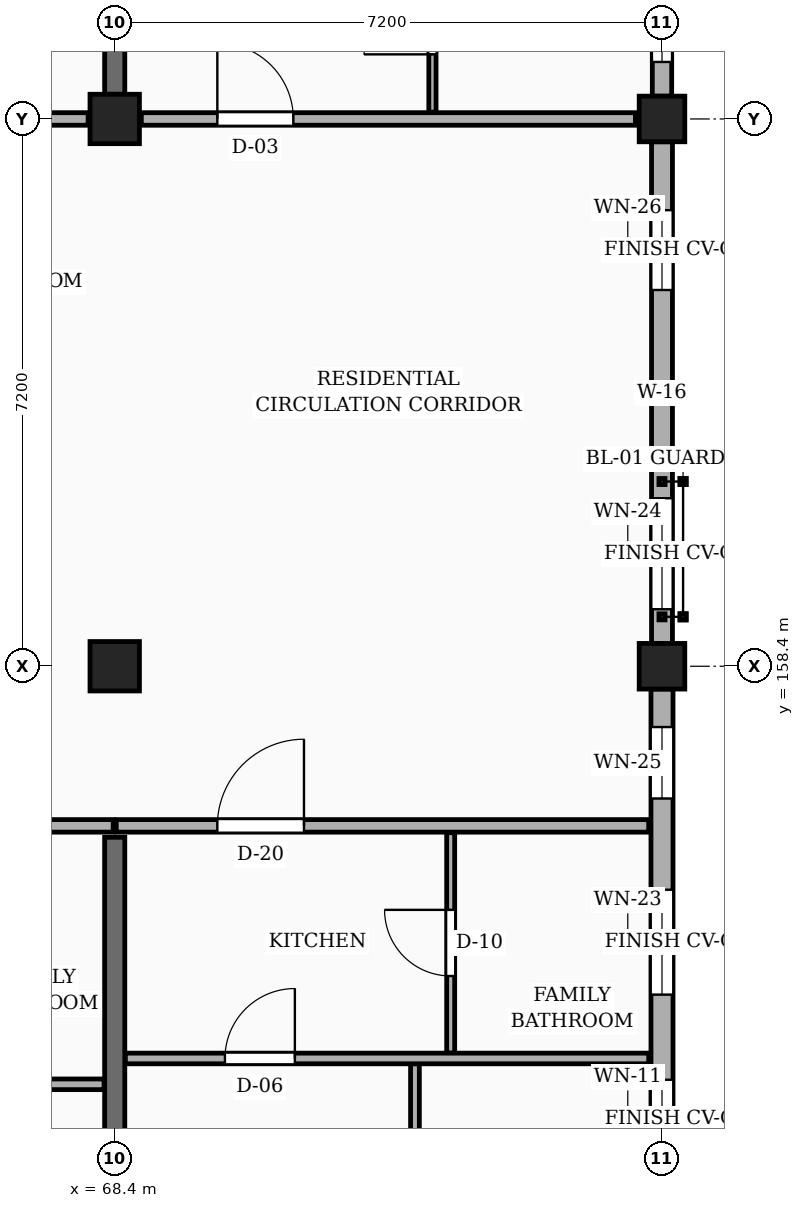
"""IFC4 building model, lengths in metres.
Left out: names, types, materials, properties, quantities, classifications, styles, units other than length and angle.
Written with IfcOpenShell. Run it as: python <this file> out.ifc"""

import sys

from ifc_helpers import new_model, si_unit, direction, frame, frame_2d, origin, origin_2d, place, context, subcontext, project, spatial, rectangle, extrude, element, fill, save


model = new_model("IFC4")
c1 = context("Model", 3, precision=1e-05, world=origin(), true_north=direction((0.0, 1.0)))
c2 = subcontext(c1, "Body", "Model", "MODEL_VIEW")
j1 = project(units=[si_unit("LENGTHUNIT", "METRE"), si_unit("PLANEANGLEUNIT", "RADIAN")], contexts=[c1])
p1 = place(None, origin())
s1 = spatial("IfcSite", under=j1, at=p1, CompositionType="ELEMENT")
p2 = place(p1, origin())
s2 = spatial("IfcBuilding", under=s1, at=p2, CompositionType="ELEMENT")
p3 = place(p2, frame((0.0, 0.0, 7.65)))
s3 = spatial("IfcBuildingStorey", under=s2, at=p3, CompositionType="ELEMENT", Elevation=7.65)
for number, where, z_axis, x_axis in (
    (1, (68.4, 158.4, 0.0), (0.0, 0.0, 1.0), (1.0, 0.0, 0.0)),
    (2, (68.4, 165.6, 0.0), (0.0, 0.0, 1.0), (1.0, 0.0, 0.0)),
):
    element("IfcColumn", number, at=place(p3, frame(where, z_axis=z_axis, x_axis=x_axis)), inside=s3, PredefinedType="COLUMN", context=c2, shape_type="SweptSolid", body=[
        extrude(rectangle(XDim=0.65, YDim=0.65, at=origin_2d()), origin(), (0.0, 0.0, 1.0), 3.15),
    ])
for number, where, z_axis, x_axis in (
    (3, (75.6, 158.4, 0.0), (0.0, 0.0, 1.0), (1.0, 0.0, 0.0)),
    (4, (75.6, 165.6, 0.0), (0.0, 0.0, 1.0), (1.0, 0.0, 0.0)),
):
    element("IfcColumn", number, at=place(p3, frame(where, z_axis=z_axis, x_axis=x_axis)), inside=s3, PredefinedType="COLUMN", context=c2, shape_type="SweptSolid", body=[
        extrude(rectangle(XDim=0.6, YDim=0.6, at=origin_2d()), origin(), (0.0, 0.0, 1.0), 3.15),
    ])
p4 = place(p3, frame((68.4, 144.3, 0.0), z_axis=(0.0, 0.0, 1.0), x_axis=(0.0, 1.0, 0.0)))
e5 = element("IfcWall", 5, at=p4, inside=s3, PredefinedType="SOLIDWALL", context=c2, shape_type="SweptSolid", body=[
    extrude(rectangle(XDim=11.85, YDim=0.265, at=frame_2d((5.925, 0.0))), origin(), (0.0, 0.0, 1.0), 2.185),
])
p5 = place(p3, frame((68.4, 165.925, 0.0), z_axis=(0.0, 0.0, 1.0), x_axis=(0.0, 1.0, 0.0)))
e6 = element("IfcWall", 6, at=p5, inside=s3, PredefinedType="SOLIDWALL", context=c2, shape_type="SweptSolid", body=[
    extrude(rectangle(XDim=6.575, YDim=0.265, at=frame_2d((3.288, 0.0))), origin(), (0.0, 0.0, 1.0), 2.185),
])
p6 = place(p3, frame((75.6, 151.5, 0.0), z_axis=(0.0, 0.0, 1.0), x_axis=(0.0, 1.0, 0.0)))
e7 = element("IfcWall", 7, at=p6, inside=s3, PredefinedType="SOLIDWALL", context=c2, shape_type="SweptSolid", body=[
    extrude(rectangle(XDim=6.6, YDim=0.29, at=frame_2d((3.3, 0.0))), origin(), (0.0, 0.0, 1.0), 2.455),
])
p7 = place(p6, frame((0.42, 0.0, 0.78)))
e8 = element("IfcOpeningElement", 8, at=p7, cuts=e7, PredefinedType="OPENING", context=c2, shape_type="SweptSolid", body=[
    extrude(rectangle(XDim=1.04, YDim=1.26, at=frame_2d((0.52, 0.63))), frame((0.0, 0.155, 0.0), z_axis=(0.0, -1.0, 0.0), x_axis=(1.0, 0.0, 0.0)), (0.0, 0.0, 1.0), 0.31),
])
p8 = place(p6, frame((2.58, 0.0, 0.78)))
e9 = element("IfcOpeningElement", 9, at=p8, cuts=e7, PredefinedType="OPENING", context=c2, shape_type="SweptSolid", body=[
    extrude(rectangle(XDim=1.38, YDim=1.36, at=frame_2d((0.69, 0.68))), frame((0.0, 0.155, 0.0), z_axis=(0.0, -1.0, 0.0), x_axis=(1.0, 0.0, 0.0)), (0.0, 0.0, 1.0), 0.31),
])
p9 = place(p6, frame((5.16, 0.0, 0.78)))
e10 = element("IfcOpeningElement", 10, at=p9, cuts=e7, PredefinedType="OPENING", context=c2, shape_type="SweptSolid", body=[
    extrude(rectangle(XDim=0.94, YDim=1.44, at=frame_2d((0.47, 0.72))), frame((0.0, 0.155, 0.0), z_axis=(0.0, -1.0, 0.0), x_axis=(1.0, 0.0, 0.0)), (0.0, 0.0, 1.0), 0.31),
])
p10 = place(p3, frame((75.6, 158.7, 0.0), z_axis=(0.0, 0.0, 1.0), x_axis=(0.0, 1.0, 0.0)))
e11 = element("IfcWall", 11, at=p10, inside=s3, PredefinedType="SOLIDWALL", context=c2, shape_type="SweptSolid", body=[
    extrude(rectangle(XDim=6.6, YDim=0.275, at=frame_2d((3.3, 0.0))), origin(), (0.0, 0.0, 1.0), 2.455),
])
p11 = place(p10, frame((0.45, 0.0, 0.78)))
e12 = element("IfcOpeningElement", 12, at=p11, cuts=e11, PredefinedType="OPENING", context=c2, shape_type="SweptSolid", body=[
    extrude(rectangle(XDim=1.46, YDim=1.36, at=frame_2d((0.73, 0.68))), frame((0.0, 0.147, 0.0), z_axis=(0.0, -1.0, 0.0), x_axis=(1.0, 0.0, 0.0)), (0.0, 0.0, 1.0), 0.295),
])
p12 = place(p10, frame((4.65, 0.0, 0.78)))
e13 = element("IfcOpeningElement", 13, at=p12, cuts=e11, PredefinedType="OPENING", context=c2, shape_type="SweptSolid", body=[
    extrude(rectangle(XDim=1.05, YDim=1.44, at=frame_2d((0.525, 0.72))), frame((0.0, 0.147, 0.0), z_axis=(0.0, -1.0, 0.0), x_axis=(1.0, 0.0, 0.0)), (0.0, 0.0, 1.0), 0.295),
])
p13 = place(p3, frame((75.6, 165.9, 0.0), z_axis=(0.0, 0.0, 1.0), x_axis=(0.0, 1.0, 0.0)))
e14 = element("IfcWall", 14, at=p13, inside=s3, PredefinedType="SOLIDWALL", context=c2, shape_type="SweptSolid", body=[
    extrude(rectangle(XDim=6.6, YDim=0.255, at=frame_2d((3.3, 0.0))), origin(), (0.0, 0.0, 1.0), 2.455),
])
p14 = place(p13, frame((0.45, 0.0, 0.78)))
e15 = element("IfcOpeningElement", 15, at=p14, cuts=e14, PredefinedType="OPENING", context=c2, shape_type="SweptSolid", body=[
    extrude(rectangle(XDim=1.05, YDim=1.44, at=frame_2d((0.525, 0.72))), frame((0.0, 0.137, 0.0), z_axis=(0.0, -1.0, 0.0), x_axis=(1.0, 0.0, 0.0)), (0.0, 0.0, 1.0), 0.275),
])
p15 = place(p13, frame((4.65, 0.0, 0.78)))
e16 = element("IfcOpeningElement", 16, at=p15, cuts=e14, PredefinedType="OPENING", context=c2, shape_type="SweptSolid", body=[
    extrude(rectangle(XDim=1.25, YDim=1.44, at=frame_2d((0.625, 0.72))), frame((0.0, 0.137, 0.0), z_axis=(0.0, -1.0, 0.0), x_axis=(1.0, 0.0, 0.0)), (0.0, 0.0, 1.0), 0.275),
])
p16 = place(p3, frame((61.22, 156.3, 0.0), z_axis=(0.0, 0.0, 1.0), x_axis=(1.0, 0.0, 0.0)))
e17 = element("IfcWall", 17, at=p16, inside=s3, PredefinedType="PARTITIONING", context=c2, shape_type="SweptSolid", body=[
    extrude(rectangle(XDim=7.16, YDim=0.165, at=frame_2d((3.58, 0.0))), origin(), (0.0, 0.0, 1.0), 2.32),
])
p17 = place(p16, frame((1.33, 0.0, 0.0)))
e18 = element("IfcOpeningElement", 18, at=p17, cuts=e17, PredefinedType="OPENING", context=c2, shape_type="SweptSolid", body=[
    extrude(rectangle(XDim=0.94, YDim=2.12, at=frame_2d((0.47, 1.06))), frame((0.0, 0.093, 0.0), z_axis=(0.0, -1.0, 0.0), x_axis=(1.0, 0.0, 0.0)), (0.0, 0.0, 1.0), 0.185),
])
p18 = place(p3, frame((68.42, 156.3, 0.0), z_axis=(0.0, 0.0, 1.0), x_axis=(1.0, 0.0, 0.0)))
e19 = element("IfcWall", 19, at=p18, inside=s3, PredefinedType="PARTITIONING", context=c2, shape_type="SweptSolid", body=[
    extrude(rectangle(XDim=7.005, YDim=0.165, at=frame_2d((3.502, 0.0))), origin(), (0.0, 0.0, 1.0), 2.32),
])
p19 = place(p18, frame((1.33, 0.0, 0.0)))
e20 = element("IfcOpeningElement", 20, at=p19, cuts=e19, PredefinedType="OPENING", context=c2, shape_type="SweptSolid", body=[
    extrude(rectangle(XDim=1.14, YDim=2.18, at=frame_2d((0.57, 1.09))), frame((0.0, 0.093, 0.0), z_axis=(0.0, -1.0, 0.0), x_axis=(1.0, 0.0, 0.0)), (0.0, 0.0, 1.0), 0.185),
])
p20 = place(p3, frame((61.55, 165.6, 0.0), z_axis=(0.0, 0.0, 1.0), x_axis=(1.0, 0.0, 0.0)))
e21 = element("IfcWall", 21, at=p20, inside=s3, PredefinedType="PARTITIONING", context=c2, shape_type="SweptSolid", body=[
    extrude(rectangle(XDim=6.5, YDim=0.165, at=frame_2d((3.25, 0.0))), origin(), (0.0, 0.0, 1.0), 2.185),
])
p21 = place(p20, frame((1.0, 0.0, 0.0)))
e22 = element("IfcOpeningElement", 22, at=p21, cuts=e21, PredefinedType="OPENING", context=c2, shape_type="SweptSolid", body=[
    extrude(rectangle(XDim=1.14, YDim=2.18, at=frame_2d((0.57, 1.09))), frame((0.0, 0.093, 0.0), z_axis=(0.0, -1.0, 0.0), x_axis=(1.0, 0.0, 0.0)), (0.0, 0.0, 1.0), 0.185),
])
p22 = place(p3, frame((68.75, 165.6, 0.0), z_axis=(0.0, 0.0, 1.0), x_axis=(1.0, 0.0, 0.0)))
e23 = element("IfcWall", 23, at=p22, inside=s3, PredefinedType="PARTITIONING", context=c2, shape_type="SweptSolid", body=[
    extrude(rectangle(XDim=6.5, YDim=0.165, at=frame_2d((3.25, 0.0))), origin(), (0.0, 0.0, 1.0), 2.185),
])
p23 = place(p22, frame((1.0, 0.0, 0.0)))
e24 = element("IfcOpeningElement", 24, at=p23, cuts=e23, PredefinedType="OPENING", context=c2, shape_type="SweptSolid", body=[
    extrude(rectangle(XDim=1.0, YDim=2.15, at=frame_2d((0.5, 1.075))), frame((0.0, 0.093, 0.0), z_axis=(0.0, -1.0, 0.0), x_axis=(1.0, 0.0, 0.0)), (0.0, 0.0, 1.0), 0.185),
])
p24 = place(p3, frame((61.34, 152.9, 0.0), z_axis=(0.0, 0.0, 1.0), x_axis=(1.0, 0.0, 0.0)))
e25 = element("IfcWall", 25, at=p24, inside=s3, PredefinedType="PARTITIONING", context=c2, shape_type="SweptSolid", body=[
    extrude(rectangle(XDim=6.92, YDim=0.14, at=frame_2d((3.46, 0.0))), origin(), (0.0, 0.0, 1.0), 2.32),
])
p25 = place(p24, frame((1.31, 0.0, 0.0)))
e26 = element("IfcOpeningElement", 26, at=p25, cuts=e25, PredefinedType="OPENING", context=c2, shape_type="SweptSolid", body=[
    extrude(rectangle(XDim=0.95, YDim=2.1, at=frame_2d((0.475, 1.05))), frame((0.0, 0.08, 0.0), z_axis=(0.0, -1.0, 0.0), x_axis=(1.0, 0.0, 0.0)), (0.0, 0.0, 1.0), 0.16),
])
p26 = place(p3, frame((72.35, 144.175, 0.0), z_axis=(0.0, 0.0, 1.0), x_axis=(0.0, 1.0, 0.0)))
e27 = element("IfcWall", 27, at=p26, inside=s3, PredefinedType="PARTITIONING", context=c2, shape_type="SweptSolid", body=[
    extrude(rectangle(XDim=8.995, YDim=0.115, at=frame_2d((4.498, 0.0))), origin(), (0.0, 0.0, 1.0), 2.32),
])
p27 = place(p26, frame((4.058, 0.0, 0.0)))
e28 = element("IfcOpeningElement", 28, at=p27, cuts=e27, PredefinedType="OPENING", context=c2, shape_type="SweptSolid", body=[
    extrude(rectangle(XDim=0.88, YDim=2.08, at=frame_2d((0.44, 1.04))), frame((0.0, 0.067, 0.0), z_axis=(0.0, -1.0, 0.0), x_axis=(1.0, 0.0, 0.0)), (0.0, 0.0, 1.0), 0.135),
])
p28 = place(p3, frame((72.82, 153.31, 0.0), z_axis=(0.0, 0.0, 1.0), x_axis=(0.0, 1.0, 0.0)))
e29 = element("IfcWall", 29, at=p28, inside=s3, PredefinedType="PARTITIONING", context=c2, shape_type="SweptSolid", body=[
    extrude(rectangle(XDim=2.9, YDim=0.105, at=frame_2d((1.45, 0.0))), origin(), (0.0, 0.0, 1.0), 2.32),
])
p29 = place(p28, frame((1.015, 0.0, 0.0)))
e30 = element("IfcOpeningElement", 30, at=p29, cuts=e29, PredefinedType="OPENING", context=c2, shape_type="SweptSolid", body=[
    extrude(rectangle(XDim=0.87, YDim=2.05, at=frame_2d((0.435, 1.025))), frame((0.0, 0.062, 0.0), z_axis=(0.0, -1.0, 0.0), x_axis=(1.0, 0.0, 0.0)), (0.0, 0.0, 1.0), 0.125),
])
p30 = place(p3, frame((68.54, 153.24, 0.0), z_axis=(0.0, 0.0, 1.0), x_axis=(1.0, 0.0, 0.0)))
e31 = element("IfcWall", 31, at=p30, inside=s3, PredefinedType="PARTITIONING", context=c2, shape_type="SweptSolid", body=[
    extrude(rectangle(XDim=6.885, YDim=0.14, at=frame_2d((3.442, 0.0))), origin(), (0.0, 0.0, 1.0), 2.32),
])
p31 = place(p30, frame((1.31, 0.0, 0.0)))
e32 = element("IfcOpeningElement", 32, at=p31, cuts=e31, PredefinedType="OPENING", context=c2, shape_type="SweptSolid", body=[
    extrude(rectangle(XDim=0.92, YDim=2.1, at=frame_2d((0.46, 1.05))), frame((0.0, 0.08, 0.0), z_axis=(0.0, -1.0, 0.0), x_axis=(1.0, 0.0, 0.0)), (0.0, 0.0, 1.0), 0.16),
])
p32 = place(p3, frame((72.58, 165.69, 0.0), z_axis=(0.0, 0.0, 1.0), x_axis=(0.0, 1.0, 0.0)))
e33 = element("IfcWall", 33, at=p32, inside=s3, PredefinedType="PARTITIONING", context=c2, shape_type="SweptSolid", body=[
    extrude(rectangle(XDim=2.42, YDim=0.095, at=frame_2d((1.21, 0.0))), origin(), (0.0, 0.0, 1.0), 2.32),
])
p33 = place(p32, frame((0.76, 0.0, 0.0)))
e34 = element("IfcOpeningElement", 34, at=p33, cuts=e33, PredefinedType="OPENING", context=c2, shape_type="SweptSolid", body=[
    extrude(rectangle(XDim=0.9, YDim=2.05, at=frame_2d((0.45, 1.025))), frame((0.0, 0.058, 0.0), z_axis=(0.0, -1.0, 0.0), x_axis=(1.0, 0.0, 0.0)), (0.0, 0.0, 1.0), 0.115),
])
p34 = place(p7, origin())
e35 = element("IfcWindow", 35, at=p34, inside=s3, PartitioningType="SINGLE_PANEL", PredefinedType="WINDOW", context=c2, shape_type="SweptSolid", body=[
    extrude(rectangle(XDim=1.04, YDim=1.26, at=frame_2d((0.52, 0.63))), frame((0.0, 0.03, 0.0), z_axis=(0.0, -1.0, 0.0), x_axis=(1.0, 0.0, 0.0)), (0.0, 0.0, 1.0), 0.06),
])
fill(e8, e35)
p35 = place(p8, origin())
e36 = element("IfcWindow", 36, at=p35, inside=s3, PartitioningType="SINGLE_PANEL", PredefinedType="WINDOW", context=c2, shape_type="SweptSolid", body=[
    extrude(rectangle(XDim=1.38, YDim=1.36, at=frame_2d((0.69, 0.68))), frame((0.0, 0.03, 0.0), z_axis=(0.0, -1.0, 0.0), x_axis=(1.0, 0.0, 0.0)), (0.0, 0.0, 1.0), 0.06),
])
fill(e9, e36)
p36 = place(p9, origin())
e37 = element("IfcWindow", 37, at=p36, inside=s3, PartitioningType="SINGLE_PANEL", PredefinedType="WINDOW", context=c2, shape_type="SweptSolid", body=[
    extrude(rectangle(XDim=0.94, YDim=1.44, at=frame_2d((0.47, 0.72))), frame((0.0, 0.03, 0.0), z_axis=(0.0, -1.0, 0.0), x_axis=(1.0, 0.0, 0.0)), (0.0, 0.0, 1.0), 0.06),
])
fill(e10, e37)
p37 = place(p11, origin())
e38 = element("IfcWindow", 38, at=p37, inside=s3, PartitioningType="SINGLE_PANEL", PredefinedType="WINDOW", context=c2, shape_type="SweptSolid", body=[
    extrude(rectangle(XDim=1.46, YDim=1.36, at=frame_2d((0.73, 0.68))), frame((0.0, 0.03, 0.0), z_axis=(0.0, -1.0, 0.0), x_axis=(1.0, 0.0, 0.0)), (0.0, 0.0, 1.0), 0.06),
])
fill(e12, e38)
p38 = place(p12, origin())
e39 = element("IfcWindow", 39, at=p38, inside=s3, PartitioningType="SINGLE_PANEL", PredefinedType="WINDOW", context=c2, shape_type="SweptSolid", body=[
    extrude(rectangle(XDim=1.05, YDim=1.44, at=frame_2d((0.525, 0.72))), frame((0.0, 0.03, 0.0), z_axis=(0.0, -1.0, 0.0), x_axis=(1.0, 0.0, 0.0)), (0.0, 0.0, 1.0), 0.06),
])
fill(e13, e39)
p39 = place(p14, origin())
e40 = element("IfcWindow", 40, at=p39, inside=s3, PartitioningType="SINGLE_PANEL", PredefinedType="WINDOW", context=c2, shape_type="SweptSolid", body=[
    extrude(rectangle(XDim=1.05, YDim=1.44, at=frame_2d((0.525, 0.72))), frame((0.0, 0.03, 0.0), z_axis=(0.0, -1.0, 0.0), x_axis=(1.0, 0.0, 0.0)), (0.0, 0.0, 1.0), 0.06),
])
fill(e15, e40)
p40 = place(p19, origin())
e41 = element("IfcDoor", 41, at=p40, inside=s3, OperationType="SINGLE_SWING_RIGHT", PredefinedType="DOOR", context=c2, shape_type="SweptSolid", body=[
    extrude(rectangle(XDim=1.14, YDim=2.18, at=frame_2d((0.57, 1.09))), frame((0.0, 0.025, 0.0), z_axis=(0.0, -1.0, 0.0), x_axis=(1.0, 0.0, 0.0)), (0.0, 0.0, 1.0), 0.05),
])
fill(e20, e41)
p41 = place(p23, origin())
e42 = element("IfcDoor", 42, at=p41, inside=s3, OperationType="SINGLE_SWING_LEFT", PredefinedType="DOOR", context=c2, shape_type="SweptSolid", body=[
    extrude(rectangle(XDim=1.0, YDim=2.15, at=frame_2d((0.5, 1.075))), frame((0.0, 0.025, 0.0), z_axis=(0.0, -1.0, 0.0), x_axis=(1.0, 0.0, 0.0)), (0.0, 0.0, 1.0), 0.05),
])
fill(e24, e42)
p42 = place(p29, origin())
e43 = element("IfcDoor", 43, at=p42, inside=s3, OperationType="SINGLE_SWING_RIGHT", PredefinedType="DOOR", context=c2, shape_type="SweptSolid", body=[
    extrude(rectangle(XDim=0.87, YDim=2.05, at=frame_2d((0.435, 1.025))), frame((0.0, 0.025, 0.0), z_axis=(0.0, -1.0, 0.0), x_axis=(1.0, 0.0, 0.0)), (0.0, 0.0, 1.0), 0.05),
])
fill(e30, e43)
p43 = place(p31, origin())
e44 = element("IfcDoor", 44, at=p43, inside=s3, OperationType="SINGLE_SWING_RIGHT", PredefinedType="DOOR", context=c2, shape_type="SweptSolid", body=[
    extrude(rectangle(XDim=0.92, YDim=2.1, at=frame_2d((0.46, 1.05))), frame((0.0, 0.025, 0.0), z_axis=(0.0, -1.0, 0.0), x_axis=(1.0, 0.0, 0.0)), (0.0, 0.0, 1.0), 0.05),
])
fill(e32, e44)
p44 = place(p33, origin())
e45 = element("IfcDoor", 45, at=p44, inside=s3, OperationType="SINGLE_SWING_LEFT", PredefinedType="DOOR", context=c2, shape_type="SweptSolid", body=[
    extrude(rectangle(XDim=0.9, YDim=2.05, at=frame_2d((0.45, 1.025))), frame((0.0, 0.025, 0.0), z_axis=(0.0, -1.0, 0.0), x_axis=(1.0, 0.0, 0.0)), (0.0, 0.0, 1.0), 0.05),
])
fill(e34, e45)
save(model, sys.argv[1])
